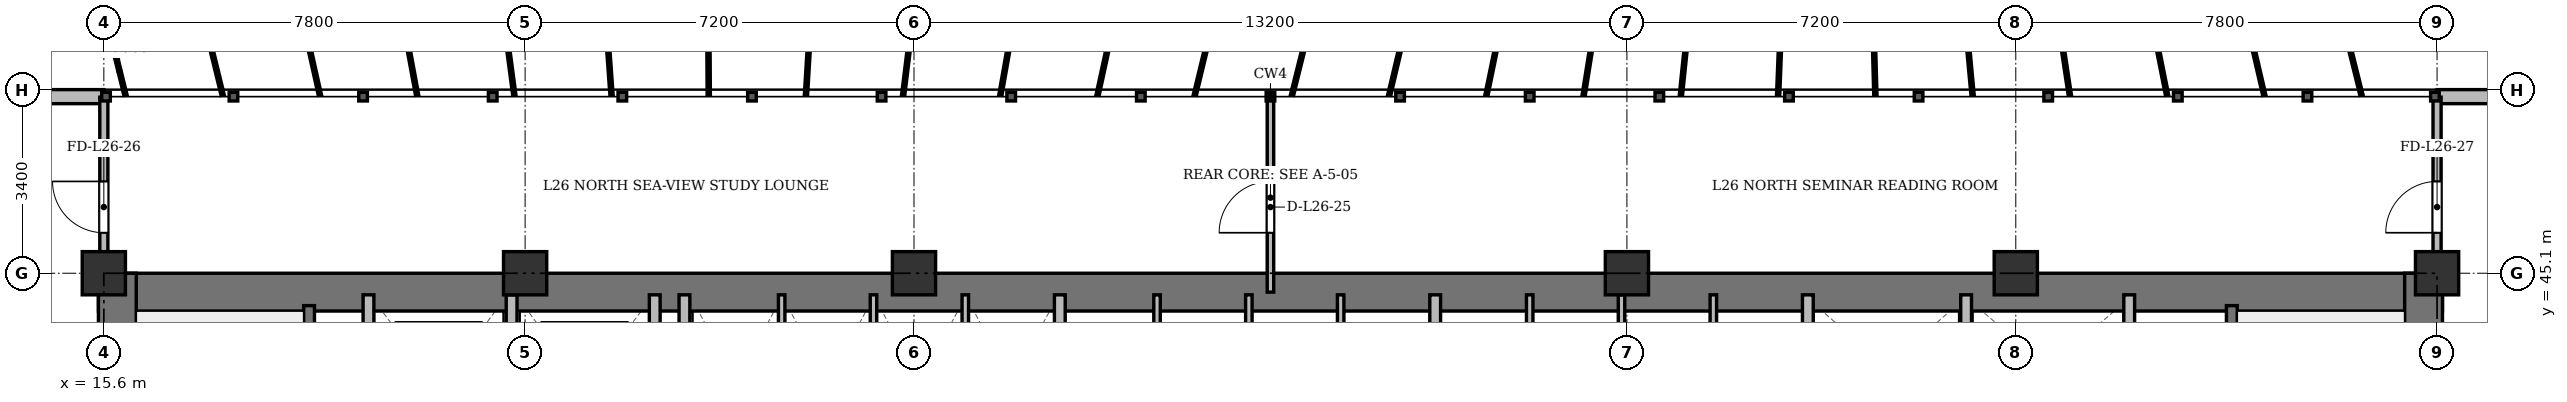
"""IFC4 building model, lengths in metres.
Left out: names, types, materials, properties, quantities, classifications, styles, units other than length and angle.
Written with IfcOpenShell. Run it as: python <this file> out.ifc"""

import sys

from ifc_helpers import new_model, si_unit, direction, frame, frame_2d, origin, origin_2d, place, context, subcontext, project, spatial, rectangle, extrude, source, transform, mapped, element, fill, save


model = new_model("IFC4")
c1 = context("Model", 3, precision=1e-05, world=origin(), true_north=direction((0.0, 1.0)))
c2 = subcontext(c1, "Body", "Model", "MODEL_VIEW")
j1 = project(units=[si_unit("LENGTHUNIT", "METRE"), si_unit("PLANEANGLEUNIT", "RADIAN")], contexts=[c1])
p1 = place(None, origin())
s1 = spatial("IfcSite", under=j1, at=p1, CompositionType="ELEMENT")
p2 = place(p1, origin())
s2 = spatial("IfcBuilding", under=s1, at=p2, CompositionType="ELEMENT")
p3 = place(p2, frame((0.0, 0.0, 103.3)))
s3 = spatial("IfcBuildingStorey", under=s2, at=p3, CompositionType="ELEMENT", Elevation=103.3)
m1 = source(origin(), c2, "Body", "SweptSolid", [
    extrude(rectangle(XDim=0.8, YDim=0.8, at=origin_2d()), origin(), (0.0, 0.0, 1.0), 3.6),
])
for number, where, z_axis, x_axis in (
    (1, (15.6, 45.1, 0.0), (0.0, 0.0, 1.0), (1.0, 0.0, 0.0)),
    (2, (23.4, 45.1, 0.0), (0.0, 0.0, 1.0), (1.0, 0.0, 0.0)),
    (3, (30.6, 45.1, 0.0), (0.0, 0.0, 1.0), (1.0, 0.0, 0.0)),
    (4, (43.8, 45.1, 0.0), (0.0, 0.0, 1.0), (1.0, 0.0, 0.0)),
    (5, (51.0, 45.1, 0.0), (0.0, 0.0, 1.0), (1.0, 0.0, 0.0)),
    (6, (58.8, 45.1, 0.0), (0.0, 0.0, 1.0), (1.0, 0.0, 0.0)),
):
    element("IfcColumn", number, at=place(p3, frame(where, z_axis=z_axis, x_axis=x_axis)), inside=s3, PredefinedType="COLUMN", context=c2, shape_type="MappedRepresentation", body=[
        mapped(m1, transform((0.0, 0.0, 0.0), x_axis=(1.0, 0.0, 0.0), y_axis=(0.0, 1.0, 0.0), z_axis=(0.0, 0.0, 1.0), scale=1.0)),
    ])
p4 = place(p3, frame((7.6, 48.37, 0.0), z_axis=(0.0, 0.0, 1.0), x_axis=(1.0, 0.0, 0.0)))
e7 = element("IfcWall", 7, at=p4, inside=s3, PredefinedType="SOLIDWALL", context=c2, shape_type="SweptSolid", body=[
    extrude(rectangle(XDim=8.0, YDim=0.26, at=frame_2d((4.0, 0.0))), origin(), (0.0, 0.0, 1.0), 3.34),
])
p5 = place(p4, frame((3.308, 0.0, 0.9)))
e8 = element("IfcOpeningElement", 8, at=p5, cuts=e7, PredefinedType="OPENING", context=c2, shape_type="SweptSolid", body=[
    extrude(rectangle(XDim=1.2, YDim=1.65, at=frame_2d((0.6, 0.825))), frame((0.0, 0.14, 0.0), z_axis=(0.0, -1.0, 0.0), x_axis=(1.0, 0.0, 0.0)), (0.0, 0.0, 1.0), 0.28),
])
p6 = place(p3, frame((58.8, 48.37, 0.0), z_axis=(0.0, 0.0, 1.0), x_axis=(1.0, 0.0, 0.0)))
e9 = element("IfcWall", 9, at=p6, inside=s3, PredefinedType="SOLIDWALL", context=c2, shape_type="SweptSolid", body=[
    extrude(rectangle(XDim=8.0, YDim=0.26, at=frame_2d((4.0, 0.0))), origin(), (0.0, 0.0, 1.0), 3.34),
])
p7 = place(p6, frame((3.308, 0.0, 0.9)))
e10 = element("IfcOpeningElement", 10, at=p7, cuts=e9, PredefinedType="OPENING", context=c2, shape_type="SweptSolid", body=[
    extrude(rectangle(XDim=1.2, YDim=1.65, at=frame_2d((0.6, 0.825))), frame((0.0, 0.14, 0.0), z_axis=(0.0, -1.0, 0.0), x_axis=(1.0, 0.0, 0.0)), (0.0, 0.0, 1.0), 0.28),
])
p8 = place(p3, frame((15.5, 44.75, 0.0), z_axis=(0.0, 0.0, 1.0), x_axis=(1.0, 0.0, 0.0)))
e11 = element("IfcWall", 11, at=p8, inside=s3, PredefinedType="SHEAR", context=c2, shape_type="SweptSolid", body=[
    extrude(rectangle(XDim=43.4, YDim=0.7, at=frame_2d((21.7, 0.0))), origin(), (0.0, 0.0, 1.0), 3.34),
])
for number, where, z_axis, x_axis in (
    (12, (15.85, 33.4, 0.0), (0.0, 0.0, 1.0), (0.0, 1.0, 0.0)),
    (13, (58.55, 33.4, 0.0), (0.0, 0.0, 1.0), (0.0, 1.0, 0.0)),
):
    element("IfcWall", number, at=place(p3, frame(where, z_axis=z_axis, x_axis=x_axis)), inside=s3, PredefinedType="SHEAR", context=c2, shape_type="SweptSolid", body=[
        extrude(rectangle(XDim=11.7, YDim=0.7, at=frame_2d((5.85, 0.0))), origin(), (0.0, 0.0, 1.0), 3.34),
    ])
p9 = place(p3, frame((19.4, 33.4, 0.0), z_axis=(0.0, 0.0, 1.0), x_axis=(0.0, 1.0, 0.0)))
e14 = element("IfcWall", 14, at=p9, inside=s3, PredefinedType="SHEAR", context=c2, shape_type="SweptSolid", body=[
    extrude(rectangle(XDim=11.1, YDim=0.2, at=frame_2d((5.55, 0.0))), origin(), (0.0, 0.0, 1.0), 3.34),
])
p10 = place(p9, frame((0.85, 0.0, 0.0)))
e15 = element("IfcOpeningElement", 15, at=p10, cuts=e14, PredefinedType="OPENING", context=c2, shape_type="SweptSolid", body=[
    extrude(rectangle(XDim=1.1, YDim=2.15, at=frame_2d((0.55, 1.075))), frame((0.0, 0.11, 0.0), z_axis=(0.0, -1.0, 0.0), x_axis=(1.0, 0.0, 0.0)), (0.0, 0.0, 1.0), 0.22),
])
p11 = place(p3, frame((55.0, 33.4, 0.0), z_axis=(0.0, 0.0, 1.0), x_axis=(0.0, 1.0, 0.0)))
e16 = element("IfcWall", 16, at=p11, inside=s3, PredefinedType="SHEAR", context=c2, shape_type="SweptSolid", body=[
    extrude(rectangle(XDim=11.1, YDim=0.2, at=frame_2d((5.55, 0.0))), origin(), (0.0, 0.0, 1.0), 3.34),
])
p12 = place(p11, frame((0.85, 0.0, 0.0)))
e17 = element("IfcOpeningElement", 17, at=p12, cuts=e16, PredefinedType="OPENING", context=c2, shape_type="SweptSolid", body=[
    extrude(rectangle(XDim=1.1, YDim=2.15, at=frame_2d((0.55, 1.075))), frame((0.0, 0.11, 0.0), z_axis=(0.0, -1.0, 0.0), x_axis=(1.0, 0.0, 0.0)), (0.0, 0.0, 1.0), 0.22),
])
for number, where, z_axis, x_axis in (
    (18, (20.5, 41.3, 0.0), (0.0, 0.0, 1.0), (0.0, 1.0, 0.0)),
    (19, (23.15, 41.3, 0.0), (0.0, 0.0, 1.0), (0.0, 1.0, 0.0)),
    (20, (25.8, 41.3, 0.0), (0.0, 0.0, 1.0), (0.0, 1.0, 0.0)),
):
    element("IfcWall", number, at=place(p3, frame(where, z_axis=z_axis, x_axis=x_axis)), inside=s3, PredefinedType="SOLIDWALL", context=c2, shape_type="SweptSolid", body=[
        extrude(rectangle(XDim=3.4, YDim=0.2, at=frame_2d((1.7, 0.0))), origin(), (0.0, 0.0, 1.0), 3.34),
    ])
p13 = place(p3, frame((26.35, 33.4, 0.0), z_axis=(0.0, 0.0, 1.0), x_axis=(0.0, 1.0, 0.0)))
e21 = element("IfcWall", 21, at=p13, inside=s3, PredefinedType="SOLIDWALL", context=c2, shape_type="SweptSolid", body=[
    extrude(rectangle(XDim=11.3, YDim=0.2, at=frame_2d((5.65, 0.0))), origin(), (0.0, 0.0, 1.0), 2.752),
])
p14 = place(p3, frame((33.3, 41.5, 0.0), z_axis=(0.0, 0.0, 1.0), x_axis=(0.0, 1.0, 0.0)))
e22 = element("IfcWall", 22, at=p14, inside=s3, PredefinedType="SOLIDWALL", context=c2, shape_type="SweptSolid", body=[
    extrude(rectangle(XDim=3.2, YDim=0.2, at=frame_2d((1.6, 0.0))), origin(), (0.0, 0.0, 1.0), 3.34),
])
for number, where, z_axis, x_axis in (
    (23, (28.15, 41.5, 0.0), (0.0, 0.0, 1.0), (0.0, 1.0, 0.0)),
    (24, (29.85, 41.5, 0.0), (0.0, 0.0, 1.0), (0.0, 1.0, 0.0)),
    (25, (31.55, 41.5, 0.0), (0.0, 0.0, 1.0), (0.0, 1.0, 0.0)),
    (26, (35.1, 41.5, 0.0), (0.0, 0.0, 1.0), (0.0, 1.0, 0.0)),
    (27, (36.8, 41.5, 0.0), (0.0, 0.0, 1.0), (0.0, 1.0, 0.0)),
    (28, (38.5, 41.5, 0.0), (0.0, 0.0, 1.0), (0.0, 1.0, 0.0)),
):
    element("IfcWall", number, at=place(p3, frame(where, z_axis=z_axis, x_axis=x_axis)), inside=s3, PredefinedType="PARTITIONING", context=c2, shape_type="SweptSolid", body=[
        extrude(rectangle(XDim=3.2, YDim=0.12, at=frame_2d((1.6, 0.0))), origin(), (0.0, 0.0, 1.0), 3.34),
    ])
p15 = place(p3, frame((40.25, 41.5, 0.0), z_axis=(0.0, 0.0, 1.0), x_axis=(0.0, 1.0, 0.0)))
e29 = element("IfcWall", 29, at=p15, inside=s3, PredefinedType="SOLIDWALL", context=c2, shape_type="SweptSolid", body=[
    extrude(rectangle(XDim=3.2, YDim=0.2, at=frame_2d((1.6, 0.0))), origin(), (0.0, 0.0, 1.0), 3.34),
])
p16 = place(p3, frame((42.0, 41.5, 0.0), z_axis=(0.0, 0.0, 1.0), x_axis=(0.0, 1.0, 0.0)))
e30 = element("IfcWall", 30, at=p16, inside=s3, PredefinedType="PARTITIONING", context=c2, shape_type="SweptSolid", body=[
    extrude(rectangle(XDim=3.2, YDim=0.12, at=frame_2d((1.6, 0.0))), origin(), (0.0, 0.0, 1.0), 3.34),
])
p17 = place(p3, frame((43.7, 41.5, 0.0), z_axis=(0.0, 0.0, 1.0), x_axis=(0.0, 1.0, 0.0)))
e31 = element("IfcWall", 31, at=p17, inside=s3, PredefinedType="PARTITIONING", context=c2, shape_type="SweptSolid", body=[
    extrude(rectangle(XDim=3.2, YDim=0.12, at=frame_2d((1.6, 0.0))), origin(), (0.0, 0.0, 1.0), 2.84),
])
p18 = place(p3, frame((45.4, 41.5, 0.0), z_axis=(0.0, 0.0, 1.0), x_axis=(0.0, 1.0, 0.0)))
e32 = element("IfcWall", 32, at=p18, inside=s3, PredefinedType="PARTITIONING", context=c2, shape_type="SweptSolid", body=[
    extrude(rectangle(XDim=3.2, YDim=0.12, at=frame_2d((1.6, 0.0))), origin(), (0.0, 0.0, 1.0), 3.34),
])
p19 = place(p3, frame((47.15, 33.4, 0.0), z_axis=(0.0, 0.0, 1.0), x_axis=(0.0, 1.0, 0.0)))
e33 = element("IfcWall", 33, at=p19, inside=s3, PredefinedType="SOLIDWALL", context=c2, shape_type="SweptSolid", body=[
    extrude(rectangle(XDim=11.3, YDim=0.2, at=frame_2d((5.65, 0.0))), origin(), (0.0, 0.0, 1.0), 2.752),
])
for number, where, z_axis, x_axis in (
    (34, (50.08, 42.05, 0.0), (0.0, 0.0, 1.0), (0.0, 1.0, 0.0)),
    (35, (53.1, 42.05, 0.0), (0.0, 0.0, 1.0), (0.0, 1.0, 0.0)),
):
    element("IfcWall", number, at=place(p3, frame(where, z_axis=z_axis, x_axis=x_axis)), inside=s3, PredefinedType="SOLIDWALL", context=c2, shape_type="SweptSolid", body=[
        extrude(rectangle(XDim=2.65, YDim=0.2, at=frame_2d((1.325, 0.0))), origin(), (0.0, 0.0, 1.0), 3.34),
    ])
p20 = place(p3, frame((37.2, 44.75, 0.0), z_axis=(0.0, 0.0, 1.0), x_axis=(0.0, 1.0, 0.0)))
e36 = element("IfcWall", 36, at=p20, inside=s3, PredefinedType="PARTITIONING", context=c2, shape_type="SweptSolid", body=[
    extrude(rectangle(XDim=3.61, YDim=0.12, at=frame_2d((1.805, 0.0))), origin(), (0.0, 0.0, 1.0), 2.752),
])
p21 = place(p20, frame((1.1, 0.0, 0.0)))
e37 = element("IfcOpeningElement", 37, at=p21, cuts=e36, PredefinedType="OPENING", context=c2, shape_type="SweptSolid", body=[
    extrude(rectangle(XDim=0.95, YDim=2.15, at=frame_2d((0.475, 1.075))), frame((0.0, 0.07, 0.0), z_axis=(0.0, -1.0, 0.0), x_axis=(1.0, 0.0, 0.0)), (0.0, 0.0, 1.0), 0.14),
])
p22 = place(p3, frame((15.6, 44.75, 0.0), z_axis=(0.0, 0.0, 1.0), x_axis=(0.0, 1.0, 0.0)))
e38 = element("IfcWall", 38, at=p22, inside=s3, PredefinedType="PARTITIONING", context=c2, shape_type="SweptSolid", body=[
    extrude(rectangle(XDim=3.61, YDim=0.15, at=frame_2d((1.805, 0.0))), origin(), (0.0, 0.0, 1.0), 2.84),
])
p23 = place(p22, frame((1.1, 0.0, 0.0)))
e39 = element("IfcOpeningElement", 39, at=p23, cuts=e38, PredefinedType="OPENING", context=c2, shape_type="SweptSolid", body=[
    extrude(rectangle(XDim=0.95, YDim=2.15, at=frame_2d((0.475, 1.075))), frame((0.0, 0.085, 0.0), z_axis=(0.0, -1.0, 0.0), x_axis=(1.0, 0.0, 0.0)), (0.0, 0.0, 1.0), 0.17),
])
p24 = place(p3, frame((58.8, 44.75, 0.0), z_axis=(0.0, 0.0, 1.0), x_axis=(0.0, 1.0, 0.0)))
e40 = element("IfcWall", 40, at=p24, inside=s3, PredefinedType="PARTITIONING", context=c2, shape_type="SweptSolid", body=[
    extrude(rectangle(XDim=3.61, YDim=0.15, at=frame_2d((1.805, 0.0))), origin(), (0.0, 0.0, 1.0), 2.84),
])
p25 = place(p24, frame((1.1, 0.0, 0.0)))
e41 = element("IfcOpeningElement", 41, at=p25, cuts=e40, PredefinedType="OPENING", context=c2, shape_type="SweptSolid", body=[
    extrude(rectangle(XDim=0.95, YDim=2.15, at=frame_2d((0.475, 1.075))), frame((0.0, 0.085, 0.0), z_axis=(0.0, -1.0, 0.0), x_axis=(1.0, 0.0, 0.0)), (0.0, 0.0, 1.0), 0.17),
])
m2 = source(origin(), c2, "Body", "SweptSolid", [
    extrude(rectangle(XDim=0.95, YDim=2.15, at=frame_2d((0.475, 1.075))), frame((0.0, 0.025, 0.0), z_axis=(0.0, -1.0, 0.0), x_axis=(1.0, 0.0, 0.0)), (0.0, 0.0, 1.0), 0.05),
])
p26 = place(p21, origin())
e42 = element("IfcDoor", 42, at=p26, inside=s3, OperationType="SINGLE_SWING_LEFT", PredefinedType="DOOR", context=c2, shape_type="MappedRepresentation", body=[
    mapped(m2, transform((0.0, 0.0, 0.0), x_axis=(1.0, 0.0, 0.0), y_axis=(0.0, 1.0, 0.0), z_axis=(0.0, 0.0, 1.0), scale=1.0)),
])
fill(e37, e42)
p27 = place(p23, origin())
e43 = element("IfcDoor", 43, at=p27, inside=s3, OperationType="SINGLE_SWING_RIGHT", PredefinedType="DOOR", context=c2, shape_type="MappedRepresentation", body=[
    mapped(m2, transform((0.0, 0.0, 0.0), x_axis=(1.0, 0.0, 0.0), y_axis=(0.0, 1.0, 0.0), z_axis=(0.0, 0.0, 1.0), scale=1.0)),
])
fill(e39, e43)
p28 = place(p25, origin())
e44 = element("IfcDoor", 44, at=p28, inside=s3, OperationType="SINGLE_SWING_LEFT", PredefinedType="DOOR", context=c2, shape_type="MappedRepresentation", body=[
    mapped(m2, transform((0.0, 0.0, 0.0), x_axis=(1.0, 0.0, 0.0), y_axis=(0.0, 1.0, 0.0), z_axis=(0.0, 0.0, 1.0), scale=1.0)),
])
fill(e41, e44)
save(model, sys.argv[1])
